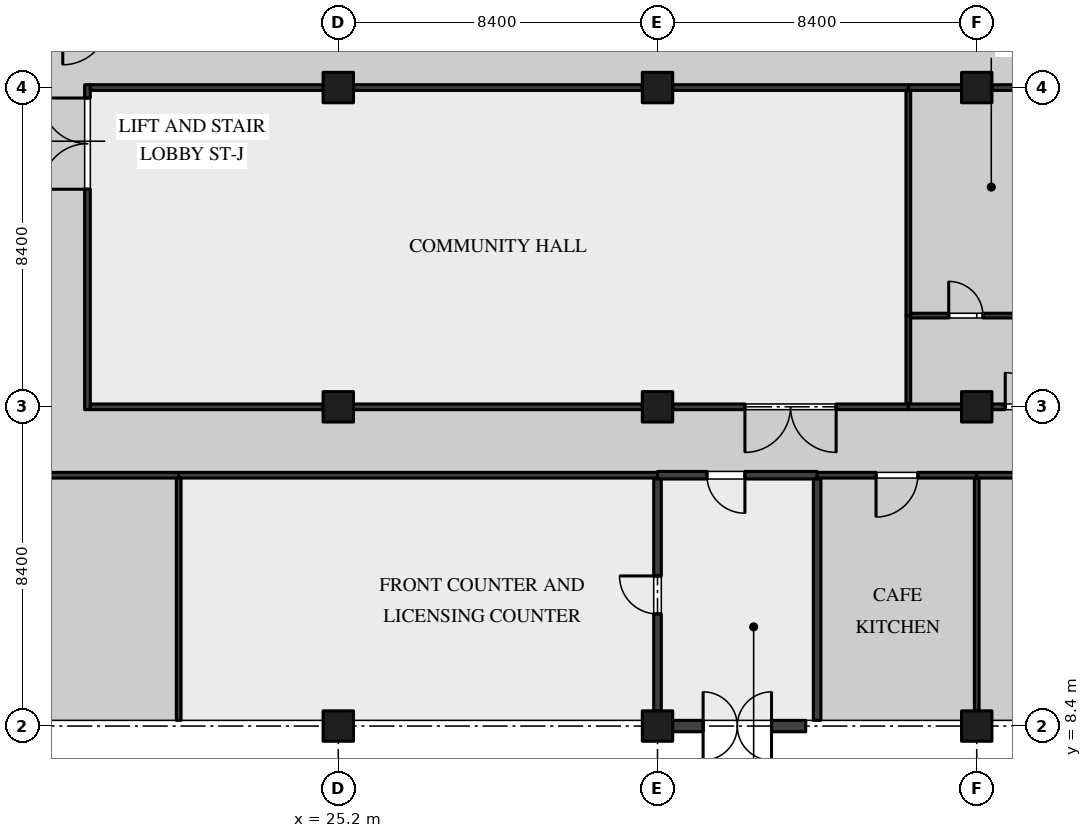
"""IFC4 building model, lengths in metres.
Left out: names, types, materials, properties, quantities, classifications, styles, units other than length and angle.
Written with IfcOpenShell. Run it as: python <this file> out.ifc"""

import sys

from ifc_helpers import new_model, si_unit, direction, frame, frame_2d, origin, origin_2d, place, context, subcontext, project, spatial, rectangle, extrude, element, fill, save


model = new_model("IFC4")
c1 = context("Model", 3, precision=1e-05, world=origin(), true_north=direction((0.0, 1.0)))
c2 = subcontext(c1, "Body", "Model", "MODEL_VIEW")
j1 = project(units=[si_unit("LENGTHUNIT", "METRE"), si_unit("PLANEANGLEUNIT", "RADIAN")], contexts=[c1])
p1 = place(None, origin())
s1 = spatial("IfcSite", under=j1, at=p1, CompositionType="ELEMENT")
p2 = place(p1, origin())
s2 = spatial("IfcBuilding", under=s1, at=p2, CompositionType="ELEMENT")
p3 = place(p2, origin())
s3 = spatial("IfcBuildingStorey", under=s2, at=p3, CompositionType="ELEMENT", Elevation=0.0)
for number, where, z_axis, x_axis in (
    (1, (25.2, 8.4, 0.0), (0.0, 0.0, 1.0), (1.0, 0.0, 0.0)),
    (2, (25.2, 16.8, 0.0), (0.0, 0.0, 1.0), (1.0, 0.0, 0.0)),
    (3, (25.2, 25.2, 0.0), (0.0, 0.0, 1.0), (1.0, 0.0, 0.0)),
    (4, (33.6, 8.4, 0.0), (0.0, 0.0, 1.0), (1.0, 0.0, 0.0)),
    (5, (33.6, 16.8, 0.0), (0.0, 0.0, 1.0), (1.0, 0.0, 0.0)),
    (6, (33.6, 25.2, 0.0), (0.0, 0.0, 1.0), (1.0, 0.0, 0.0)),
    (7, (42.0, 8.4, 0.0), (0.0, 0.0, 1.0), (1.0, 0.0, 0.0)),
    (8, (42.0, 16.8, 0.0), (0.0, 0.0, 1.0), (1.0, 0.0, 0.0)),
    (9, (42.0, 25.2, 0.0), (0.0, 0.0, 1.0), (1.0, 0.0, 0.0)),
):
    element("IfcColumn", number, at=place(p3, frame(where, z_axis=z_axis, x_axis=x_axis)), inside=s3, PredefinedType="COLUMN", context=c2, shape_type="SweptSolid", body=[
        extrude(rectangle(XDim=0.8, YDim=0.8, at=origin_2d()), origin(), (0.0, 0.0, 1.0), 5.05),
    ])
p4 = place(p3, frame((40.2, 16.875, 0.0), z_axis=(0.0, 0.0, 1.0), x_axis=(0.0, 1.0, 0.0)))
e10 = element("IfcWall", 10, at=p4, inside=s3, PredefinedType="PARTITIONING", context=c2, shape_type="SweptSolid", body=[
    extrude(rectangle(XDim=2.325, YDim=0.125, at=frame_2d((1.163, 0.0))), origin(), (0.0, 0.0, 1.0), 5.05),
])
p5 = place(p3, frame((40.2, 19.2, 0.0), z_axis=(0.0, 0.0, 1.0), x_axis=(0.0, 1.0, 0.0)))
e11 = element("IfcWall", 11, at=p5, inside=s3, PredefinedType="PARTITIONING", context=c2, shape_type="SweptSolid", body=[
    extrude(rectangle(XDim=5.925, YDim=0.125, at=frame_2d((2.962, 0.0))), origin(), (0.0, 0.0, 1.0), 5.05),
])
p6 = place(p3, frame((18.6, 16.725, 0.0), z_axis=(0.0, 0.0, 1.0), x_axis=(0.0, 1.0, 0.0)))
e12 = element("IfcWall", 12, at=p6, inside=s3, PredefinedType="PARTITIONING", context=c2, shape_type="SweptSolid", body=[
    extrude(rectangle(XDim=8.55, YDim=0.15, at=frame_2d((4.275, 0.0))), origin(), (0.0, 0.0, 1.0), 5.05),
])
p7 = place(p6, frame((5.8, 0.0, 0.0)))
e13 = element("IfcOpeningElement", 13, at=p7, cuts=e12, PredefinedType="OPENING", context=c2, shape_type="SweptSolid", body=[
    extrude(rectangle(XDim=2.4, YDim=2.7, at=frame_2d((1.2, 1.35))), frame((0.0, 0.085, 0.0), z_axis=(0.0, -1.0, 0.0), x_axis=(1.0, 0.0, 0.0)), (0.0, 0.0, 1.0), 0.17),
])
p8 = place(p3, frame((18.675, 16.8, 0.0), z_axis=(0.0, 0.0, 1.0), x_axis=(1.0, 0.0, 0.0)))
e14 = element("IfcWall", 14, at=p8, inside=s3, PredefinedType="PARTITIONING", context=c2, shape_type="SweptSolid", body=[
    extrude(rectangle(XDim=6.125, YDim=0.15, at=frame_2d((3.062, 0.0))), origin(), (0.0, 0.0, 1.0), 5.05),
])
p9 = place(p3, frame((25.6, 16.8, 0.0), z_axis=(0.0, 0.0, 1.0), x_axis=(1.0, 0.0, 0.0)))
e15 = element("IfcWall", 15, at=p9, inside=s3, PredefinedType="PARTITIONING", context=c2, shape_type="SweptSolid", body=[
    extrude(rectangle(XDim=7.6, YDim=0.15, at=frame_2d((3.8, 0.0))), origin(), (0.0, 0.0, 1.0), 5.05),
])
p10 = place(p3, frame((34.0, 16.8, 0.0), z_axis=(0.0, 0.0, 1.0), x_axis=(1.0, 0.0, 0.0)))
e16 = element("IfcWall", 16, at=p10, inside=s3, PredefinedType="PARTITIONING", context=c2, shape_type="SweptSolid", body=[
    extrude(rectangle(XDim=6.2, YDim=0.15, at=frame_2d((3.1, 0.0))), origin(), (0.0, 0.0, 1.0), 5.05),
])
p11 = place(p10, frame((1.9, 0.0, 0.0)))
e17 = element("IfcOpeningElement", 17, at=p11, cuts=e16, PredefinedType="OPENING", context=c2, shape_type="SweptSolid", body=[
    extrude(rectangle(XDim=2.4, YDim=2.7, at=frame_2d((1.2, 1.35))), frame((0.0, 0.085, 0.0), z_axis=(0.0, -1.0, 0.0), x_axis=(1.0, 0.0, 0.0)), (0.0, 0.0, 1.0), 0.17),
])
p12 = place(p3, frame((18.675, 25.2, 0.0), z_axis=(0.0, 0.0, 1.0), x_axis=(1.0, 0.0, 0.0)))
e18 = element("IfcWall", 18, at=p12, inside=s3, PredefinedType="PARTITIONING", context=c2, shape_type="SweptSolid", body=[
    extrude(rectangle(XDim=6.125, YDim=0.15, at=frame_2d((3.062, 0.0))), origin(), (0.0, 0.0, 1.0), 5.05),
])
p13 = place(p3, frame((25.6, 25.2, 0.0), z_axis=(0.0, 0.0, 1.0), x_axis=(1.0, 0.0, 0.0)))
e19 = element("IfcWall", 19, at=p13, inside=s3, PredefinedType="PARTITIONING", context=c2, shape_type="SweptSolid", body=[
    extrude(rectangle(XDim=7.6, YDim=0.15, at=frame_2d((3.8, 0.0))), origin(), (0.0, 0.0, 1.0), 5.05),
])
p14 = place(p3, frame((34.0, 25.2, 0.0), z_axis=(0.0, 0.0, 1.0), x_axis=(1.0, 0.0, 0.0)))
e20 = element("IfcWall", 20, at=p14, inside=s3, PredefinedType="PARTITIONING", context=c2, shape_type="SweptSolid", body=[
    extrude(rectangle(XDim=6.2, YDim=0.15, at=frame_2d((3.1, 0.0))), origin(), (0.0, 0.0, 1.0), 5.05),
])
p15 = place(p3, frame((40.263, 19.2, 0.0), z_axis=(0.0, 0.0, 1.0), x_axis=(1.0, 0.0, 0.0)))
e21 = element("IfcWall", 21, at=p15, inside=s3, PredefinedType="PARTITIONING", context=c2, shape_type="SweptSolid", body=[
    extrude(rectangle(XDim=2.937, YDim=0.125, at=frame_2d((1.469, 0.0))), origin(), (0.0, 0.0, 1.0), 5.05),
])
p16 = place(p15, frame((1.0, 0.0, 0.0)))
e22 = element("IfcOpeningElement", 22, at=p16, cuts=e21, PredefinedType="OPENING", context=c2, shape_type="SweptSolid", body=[
    extrude(rectangle(XDim=0.9, YDim=2.1, at=frame_2d((0.45, 1.05))), frame((0.0, 0.073, 0.0), z_axis=(0.0, -1.0, 0.0), x_axis=(1.0, 0.0, 0.0)), (0.0, 0.0, 1.0), 0.145),
])
p17 = place(p3, frame((40.2, 16.8, 0.0), z_axis=(0.0, 0.0, 1.0), x_axis=(1.0, 0.0, 0.0)))
e23 = element("IfcWall", 23, at=p17, inside=s3, PredefinedType="PARTITIONING", context=c2, shape_type="SweptSolid", body=[
    extrude(rectangle(XDim=1.4, YDim=0.15, at=frame_2d((0.7, 0.0))), origin(), (0.0, 0.0, 1.0), 5.05),
])
p18 = place(p3, frame((42.4, 16.8, 0.0), z_axis=(0.0, 0.0, 1.0), x_axis=(1.0, 0.0, 0.0)))
e24 = element("IfcWall", 24, at=p18, inside=s3, PredefinedType="PARTITIONING", context=c2, shape_type="SweptSolid", body=[
    extrude(rectangle(XDim=6.275, YDim=0.15, at=frame_2d((3.138, 0.0))), origin(), (0.0, 0.0, 1.0), 5.05),
])
p19 = place(p18, frame((0.35, 0.0, 0.0)))
e25 = element("IfcOpeningElement", 25, at=p19, cuts=e24, PredefinedType="OPENING", context=c2, shape_type="SweptSolid", body=[
    extrude(rectangle(XDim=0.9, YDim=2.1, at=frame_2d((0.45, 1.05))), frame((0.0, 0.085, 0.0), z_axis=(0.0, -1.0, 0.0), x_axis=(1.0, 0.0, 0.0)), (0.0, 0.0, 1.0), 0.17),
])
p20 = place(p3, frame((40.2, 25.2, 0.0), z_axis=(0.0, 0.0, 1.0), x_axis=(1.0, 0.0, 0.0)))
e26 = element("IfcWall", 26, at=p20, inside=s3, PredefinedType="PARTITIONING", context=c2, shape_type="SweptSolid", body=[
    extrude(rectangle(XDim=1.4, YDim=0.15, at=frame_2d((0.7, 0.0))), origin(), (0.0, 0.0, 1.0), 5.05),
])
p21 = place(p3, frame((42.4, 25.2, 0.0), z_axis=(0.0, 0.0, 1.0), x_axis=(1.0, 0.0, 0.0)))
e27 = element("IfcWall", 27, at=p21, inside=s3, PredefinedType="PARTITIONING", context=c2, shape_type="SweptSolid", body=[
    extrude(rectangle(XDim=0.8, YDim=0.15, at=frame_2d((0.4, 0.0))), origin(), (0.0, 0.0, 1.0), 5.05),
])
p22 = place(p3, frame((12.6, 15.0, 0.0), z_axis=(0.0, 0.0, 1.0), x_axis=(1.0, 0.0, 0.0)))
e28 = element("IfcWall", 28, at=p22, inside=s3, PredefinedType="PARTITIONING", context=c2, shape_type="SweptSolid", body=[
    extrude(rectangle(XDim=8.4, YDim=0.15, at=frame_2d((4.2, 0.0))), origin(), (0.0, 0.0, 1.0), 5.05),
])
p23 = place(p22, frame((3.6, 0.0, 0.0)))
e29 = element("IfcOpeningElement", 29, at=p23, cuts=e28, PredefinedType="OPENING", context=c2, shape_type="SweptSolid", body=[
    extrude(rectangle(XDim=1.2, YDim=2.4, at=frame_2d((0.6, 1.2))), frame((0.0, 0.085, 0.0), z_axis=(0.0, -1.0, 0.0), x_axis=(1.0, 0.0, 0.0)), (0.0, 0.0, 1.0), 0.17),
])
p24 = place(p3, frame((21.0, 15.0, 0.0), z_axis=(0.0, 0.0, 1.0), x_axis=(1.0, 0.0, 0.0)))
e30 = element("IfcWall", 30, at=p24, inside=s3, PredefinedType="PARTITIONING", context=c2, shape_type="SweptSolid", body=[
    extrude(rectangle(XDim=12.6, YDim=0.15, at=frame_2d((6.3, 0.0))), origin(), (0.0, 0.0, 1.0), 5.05),
])
p25 = place(p3, frame((33.6, 15.0, 0.0), z_axis=(0.0, 0.0, 1.0), x_axis=(1.0, 0.0, 0.0)))
e31 = element("IfcWall", 31, at=p25, inside=s3, PredefinedType="PARTITIONING", context=c2, shape_type="SweptSolid", body=[
    extrude(rectangle(XDim=4.2, YDim=0.2, at=frame_2d((2.1, 0.0))), origin(), (0.0, 0.0, 1.0), 5.05),
])
p26 = place(p25, frame((1.3, 0.0, 0.0)))
e32 = element("IfcOpeningElement", 32, at=p26, cuts=e31, PredefinedType="OPENING", context=c2, shape_type="SweptSolid", body=[
    extrude(rectangle(XDim=1.0, YDim=2.4, at=frame_2d((0.5, 1.2))), frame((0.0, 0.11, 0.0), z_axis=(0.0, -1.0, 0.0), x_axis=(1.0, 0.0, 0.0)), (0.0, 0.0, 1.0), 0.22),
])
p27 = place(p3, frame((37.8, 15.0, 0.0), z_axis=(0.0, 0.0, 1.0), x_axis=(1.0, 0.0, 0.0)))
e33 = element("IfcWall", 33, at=p27, inside=s3, PredefinedType="PARTITIONING", context=c2, shape_type="SweptSolid", body=[
    extrude(rectangle(XDim=4.2, YDim=0.15, at=frame_2d((2.1, 0.0))), origin(), (0.0, 0.0, 1.0), 5.05),
])
p28 = place(p27, frame((1.55, 0.0, 0.0)))
e34 = element("IfcOpeningElement", 34, at=p28, cuts=e33, PredefinedType="OPENING", context=c2, shape_type="SweptSolid", body=[
    extrude(rectangle(XDim=1.1, YDim=2.1, at=frame_2d((0.55, 1.05))), frame((0.0, 0.085, 0.0), z_axis=(0.0, -1.0, 0.0), x_axis=(1.0, 0.0, 0.0)), (0.0, 0.0, 1.0), 0.17),
])
p29 = place(p3, frame((42.0, 15.0, 0.0), z_axis=(0.0, 0.0, 1.0), x_axis=(1.0, 0.0, 0.0)))
e35 = element("IfcWall", 35, at=p29, inside=s3, PredefinedType="PARTITIONING", context=c2, shape_type="SweptSolid", body=[
    extrude(rectangle(XDim=16.65, YDim=0.15, at=frame_2d((8.325, 0.0))), origin(), (0.0, 0.0, 1.0), 5.05),
])
p30 = place(p29, frame((7.4, 0.0, 0.0)))
e36 = element("IfcOpeningElement", 36, at=p30, cuts=e35, PredefinedType="OPENING", context=c2, shape_type="SweptSolid", body=[
    extrude(rectangle(XDim=1.8, YDim=2.4, at=frame_2d((0.9, 1.2))), frame((0.0, 0.085, 0.0), z_axis=(0.0, -1.0, 0.0), x_axis=(1.0, 0.0, 0.0)), (0.0, 0.0, 1.0), 0.17),
])
p31 = place(p3, frame((21.0, 8.55, 0.0), z_axis=(0.0, 0.0, 1.0), x_axis=(0.0, 1.0, 0.0)))
e37 = element("IfcWall", 37, at=p31, inside=s3, PredefinedType="PARTITIONING", context=c2, shape_type="SweptSolid", body=[
    extrude(rectangle(XDim=6.375, YDim=0.125, at=frame_2d((3.188, 0.0))), origin(), (0.0, 0.0, 1.0), 5.05),
])
p32 = place(p3, frame((33.6, 8.8, 0.0), z_axis=(0.0, 0.0, 1.0), x_axis=(0.0, 1.0, 0.0)))
e38 = element("IfcWall", 38, at=p32, inside=s3, PredefinedType="PARTITIONING", context=c2, shape_type="SweptSolid", body=[
    extrude(rectangle(XDim=6.1, YDim=0.2, at=frame_2d((3.05, 0.0))), origin(), (0.0, 0.0, 1.0), 5.05),
])
p33 = place(p32, frame((2.55, 0.0, 0.0)))
e39 = element("IfcOpeningElement", 39, at=p33, cuts=e38, PredefinedType="OPENING", context=c2, shape_type="SweptSolid", body=[
    extrude(rectangle(XDim=1.0, YDim=2.4, at=frame_2d((0.5, 1.2))), frame((0.0, 0.11, 0.0), z_axis=(0.0, -1.0, 0.0), x_axis=(1.0, 0.0, 0.0)), (0.0, 0.0, 1.0), 0.22),
])
p34 = place(p3, frame((37.8, 8.55, 0.0), z_axis=(0.0, 0.0, 1.0), x_axis=(0.0, 1.0, 0.0)))
e40 = element("IfcWall", 40, at=p34, inside=s3, PredefinedType="PARTITIONING", context=c2, shape_type="SweptSolid", body=[
    extrude(rectangle(XDim=6.35, YDim=0.2, at=frame_2d((3.175, 0.0))), origin(), (0.0, 0.0, 1.0), 5.05),
])
p35 = place(p3, frame((42.0, 8.8, 0.0), z_axis=(0.0, 0.0, 1.0), x_axis=(0.0, 1.0, 0.0)))
e41 = element("IfcWall", 41, at=p35, inside=s3, PredefinedType="PARTITIONING", context=c2, shape_type="SweptSolid", body=[
    extrude(rectangle(XDim=6.125, YDim=0.125, at=frame_2d((3.062, 0.0))), origin(), (0.0, 0.0, 1.0), 5.05),
])
p36 = place(p3, frame((33.98, 8.4, 0.0), z_axis=(0.0, 0.0, 1.0), x_axis=(1.0, 0.0, 0.0)))
e42 = element("IfcWall", 42, at=p36, inside=s3, PredefinedType="SOLIDWALL", context=c2, shape_type="SweptSolid", body=[
    extrude(rectangle(XDim=3.52, YDim=0.3, at=frame_2d((1.76, 0.0))), origin(), (0.0, 0.0, 1.0), 5.05),
])
p37 = place(p36, frame((0.82, 0.0, 0.0)))
e43 = element("IfcOpeningElement", 43, at=p37, cuts=e42, PredefinedType="OPENING", context=c2, shape_type="SweptSolid", body=[
    extrude(rectangle(XDim=1.8, YDim=2.4, at=frame_2d((0.9, 1.2))), frame((0.0, 0.16, 0.0), z_axis=(0.0, -1.0, 0.0), x_axis=(1.0, 0.0, 0.0)), (0.0, 0.0, 1.0), 0.32),
])
p38 = place(p7, origin())
e44 = element("IfcDoor", 44, at=p38, inside=s3, OperationType="DOUBLE_DOOR_SINGLE_SWING", PredefinedType="DOOR", context=c2, shape_type="SweptSolid", body=[
    extrude(rectangle(XDim=2.4, YDim=2.7, at=frame_2d((1.2, 1.35))), frame((0.0, 0.025, 0.0), z_axis=(0.0, -1.0, 0.0), x_axis=(1.0, 0.0, 0.0)), (0.0, 0.0, 1.0), 0.05),
])
fill(e13, e44)
p39 = place(p11, frame((2.4, 0.0, 0.0), z_axis=(0.0, 0.0, 1.0), x_axis=(-1.0, 0.0, 0.0)))
e45 = element("IfcDoor", 45, at=p39, inside=s3, OperationType="DOUBLE_DOOR_SINGLE_SWING", PredefinedType="DOOR", context=c2, shape_type="SweptSolid", body=[
    extrude(rectangle(XDim=2.4, YDim=2.7, at=frame_2d((1.2, 1.35))), frame((0.0, 0.025, 0.0), z_axis=(0.0, -1.0, 0.0), x_axis=(1.0, 0.0, 0.0)), (0.0, 0.0, 1.0), 0.05),
])
fill(e17, e45)
p40 = place(p19, origin())
e46 = element("IfcDoor", 46, at=p40, inside=s3, OperationType="SINGLE_SWING_RIGHT", PredefinedType="DOOR", context=c2, shape_type="SweptSolid", body=[
    extrude(rectangle(XDim=0.9, YDim=2.1, at=frame_2d((0.45, 1.05))), frame((0.0, 0.025, 0.0), z_axis=(0.0, -1.0, 0.0), x_axis=(1.0, 0.0, 0.0)), (0.0, 0.0, 1.0), 0.05),
])
fill(e25, e46)
p41 = place(p16, origin())
e47 = element("IfcDoor", 47, at=p41, inside=s3, OperationType="SINGLE_SWING_RIGHT", PredefinedType="DOOR", context=c2, shape_type="SweptSolid", body=[
    extrude(rectangle(XDim=0.9, YDim=2.1, at=frame_2d((0.45, 1.05))), frame((0.0, 0.02, 0.0), z_axis=(0.0, -1.0, 0.0), x_axis=(1.0, 0.0, 0.0)), (0.0, 0.0, 1.0), 0.04),
])
fill(e22, e47)
p42 = place(p33, origin())
e48 = element("IfcDoor", 48, at=p42, inside=s3, OperationType="SINGLE_SWING_LEFT", PredefinedType="DOOR", context=c2, shape_type="SweptSolid", body=[
    extrude(rectangle(XDim=1.0, YDim=2.4, at=frame_2d((0.5, 1.2))), frame((0.0, 0.035, 0.0), z_axis=(0.0, -1.0, 0.0), x_axis=(1.0, 0.0, 0.0)), (0.0, 0.0, 1.0), 0.07),
])
fill(e39, e48)
p43 = place(p26, frame((1.0, 0.0, 0.0), z_axis=(0.0, 0.0, 1.0), x_axis=(-1.0, 0.0, 0.0)))
e49 = element("IfcDoor", 49, at=p43, inside=s3, OperationType="SINGLE_SWING_RIGHT", PredefinedType="DOOR", context=c2, shape_type="SweptSolid", body=[
    extrude(rectangle(XDim=1.0, YDim=2.4, at=frame_2d((0.5, 1.2))), frame((0.0, 0.03, 0.0), z_axis=(0.0, -1.0, 0.0), x_axis=(1.0, 0.0, 0.0)), (0.0, 0.0, 1.0), 0.06),
])
fill(e32, e49)
p44 = place(p28, frame((1.1, 0.0, 0.0), z_axis=(0.0, 0.0, 1.0), x_axis=(-1.0, 0.0, 0.0)))
e50 = element("IfcDoor", 50, at=p44, inside=s3, OperationType="SINGLE_SWING_LEFT", PredefinedType="DOOR", context=c2, shape_type="SweptSolid", body=[
    extrude(rectangle(XDim=1.1, YDim=2.1, at=frame_2d((0.55, 1.05))), frame((0.0, 0.025, 0.0), z_axis=(0.0, -1.0, 0.0), x_axis=(1.0, 0.0, 0.0)), (0.0, 0.0, 1.0), 0.05),
])
fill(e34, e50)
p45 = place(p37, frame((1.8, 0.0, 0.0), z_axis=(0.0, 0.0, 1.0), x_axis=(-1.0, 0.0, 0.0)))
e51 = element("IfcDoor", 51, at=p45, inside=s3, OperationType="DOUBLE_DOOR_DOUBLE_SWING", PredefinedType="DOOR", context=c2, shape_type="SweptSolid", body=[
    extrude(rectangle(XDim=1.8, YDim=2.4, at=frame_2d((0.9, 1.2))), frame((0.0, 0.025, 0.0), z_axis=(0.0, -1.0, 0.0), x_axis=(1.0, 0.0, 0.0)), (0.0, 0.0, 1.0), 0.05),
])
fill(e43, e51)
save(model, sys.argv[1])
